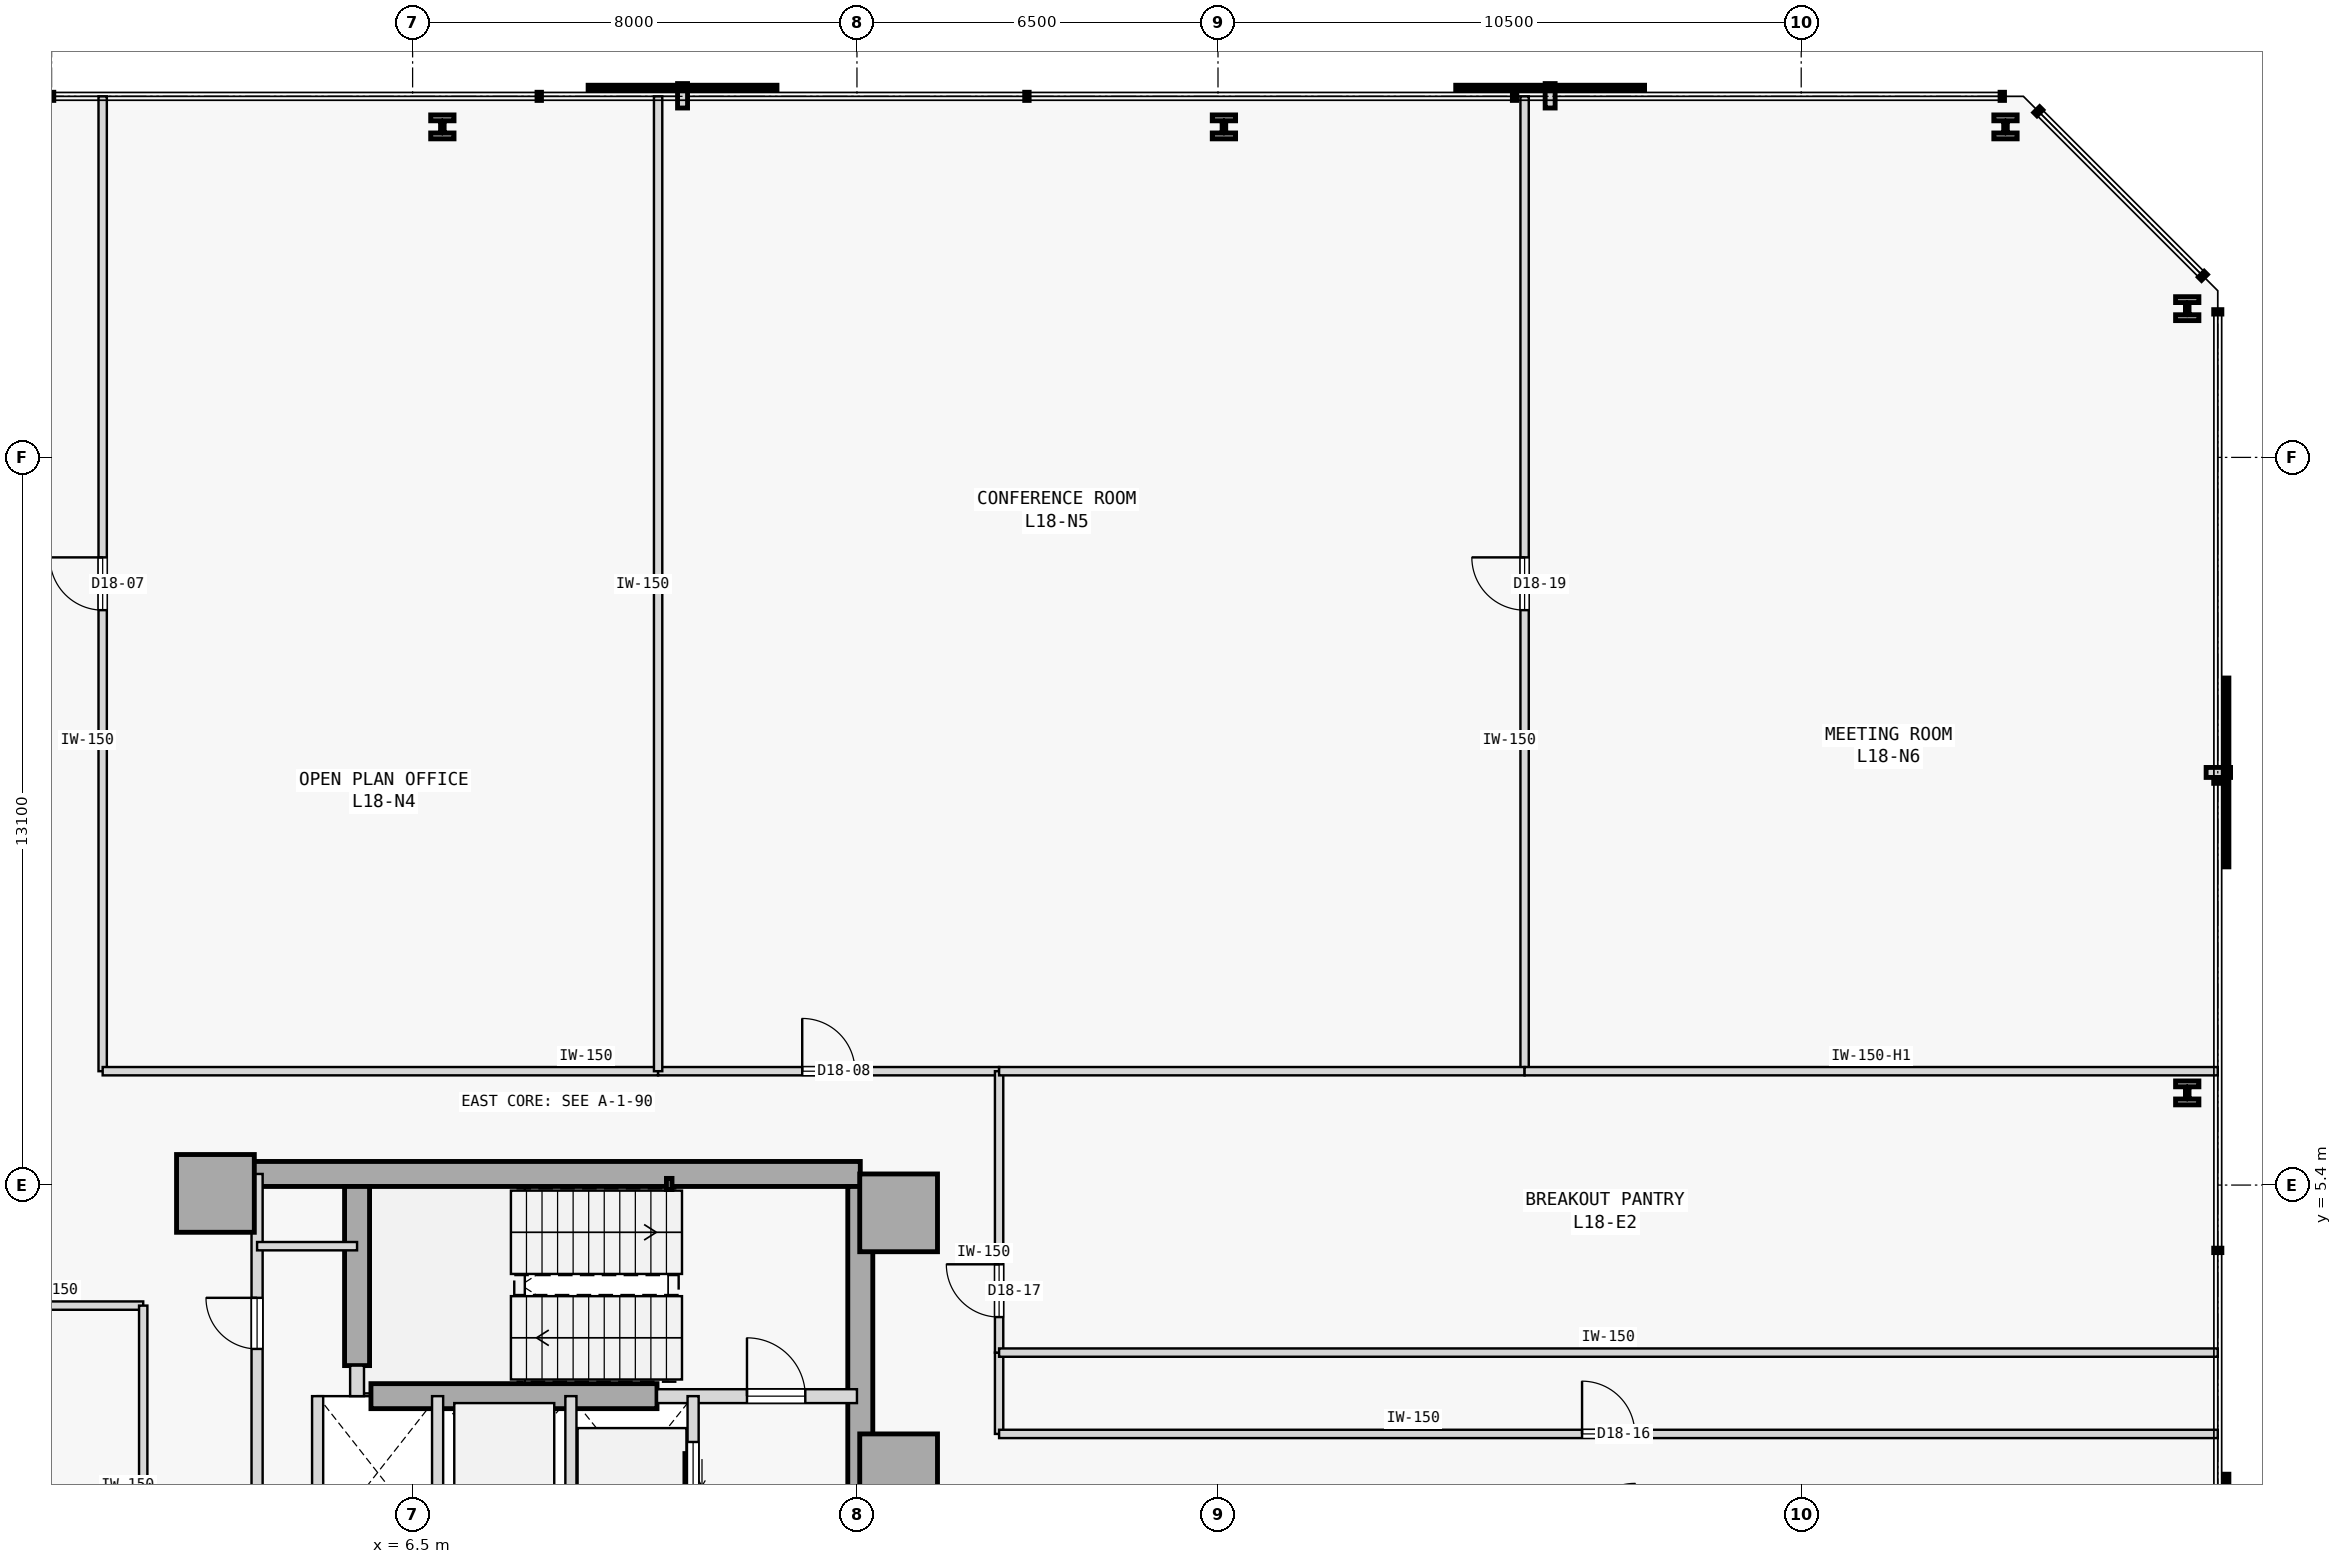
"""IFC4 building model, lengths in metres.
Left out: names, types, materials, properties, quantities, classifications, styles, units other than length and angle.
Written with IfcOpenShell. Run it as: python <this file> out.ifc"""

import sys

from ifc_helpers import new_model, si_unit, direction, frame, frame_2d, origin, origin_2d, place, context, subcontext, project, spatial, rectangle, hollow_rectangle, i_section, extrude, element, fill, save


model = new_model("IFC4")
c1 = context("Model", 3, precision=1e-05, world=origin(), true_north=direction((0.0, 1.0)))
c2 = subcontext(c1, "Body", "Model", "MODEL_VIEW")
j1 = project(units=[si_unit("LENGTHUNIT", "METRE"), si_unit("PLANEANGLEUNIT", "RADIAN")], contexts=[c1])
p1 = place(None, origin())
s1 = spatial("IfcSite", under=j1, at=p1, CompositionType="ELEMENT")
p2 = place(p1, origin())
s2 = spatial("IfcBuilding", under=s1, at=p2, CompositionType="ELEMENT")
p3 = place(p2, frame((0.0, 0.0, 75.0)))
s3 = spatial("IfcBuildingStorey", under=s2, at=p3, CompositionType="ELEMENT", Elevation=75.0)
for number, where, z_axis, x_axis in (
    (1, (15.25, 4.9, 0.0), (0.0, 0.0, 1.0), (1.0, 0.0, 0.0)),
    (2, (15.25, 0.22, 0.0), (0.0, 0.0, 1.0), (1.0, 0.0, 0.0)),
    (3, (2.95, 5.25, 0.0), (0.0, 0.0, 1.0), (1.0, 0.0, 0.0)),
):
    element("IfcColumn", number, at=place(p3, frame(where, z_axis=z_axis, x_axis=x_axis)), inside=s3, PredefinedType="COLUMN", context=c2, shape_type="SweptSolid", body=[
        extrude(rectangle(XDim=1.4, YDim=1.4, at=origin_2d()), origin(), (0.0, 0.0, 1.0), 3.8),
    ])
p4 = place(p3, frame((3.15, 5.6, 0.0), z_axis=(0.0, 0.0, 1.0), x_axis=(1.0, 0.0, 0.0)))
e4 = element("IfcWall", 4, at=p4, inside=s3, PredefinedType="SHEAR", context=c2, shape_type="SweptSolid", body=[
    extrude(rectangle(XDim=11.41, YDim=0.45, at=frame_2d((5.705, 0.0))), origin(), (0.0, 0.0, 1.0), 3.4),
])
p5 = place(p3, frame((14.56, -5.375, 0.0), z_axis=(0.0, 0.0, 1.0), x_axis=(0.0, 1.0, 0.0)))
e5 = element("IfcWall", 5, at=p5, inside=s3, PredefinedType="SHEAR", context=c2, shape_type="SweptSolid", body=[
    extrude(rectangle(XDim=10.75, YDim=0.45, at=frame_2d((5.375, 0.0))), origin(), (0.0, 0.0, 1.0), 3.4),
])
p6 = place(p3, frame((5.5, 2.15, 0.0), z_axis=(0.0, 0.0, 1.0), x_axis=(0.0, 1.0, 0.0)))
e6 = element("IfcWall", 6, at=p6, inside=s3, PredefinedType="SHEAR", context=c2, shape_type="SweptSolid", body=[
    extrude(rectangle(XDim=3.225, YDim=0.45, at=frame_2d((1.613, 0.0))), origin(), (0.0, 0.0, 1.0), 3.4),
])
p7 = place(p3, frame((5.75, 1.6, 0.0), z_axis=(0.0, 0.0, 1.0), x_axis=(1.0, 0.0, 0.0)))
e7 = element("IfcWall", 7, at=p7, inside=s3, PredefinedType="SHEAR", context=c2, shape_type="SweptSolid", body=[
    extrude(rectangle(XDim=5.15, YDim=0.45, at=frame_2d((2.575, 0.0))), origin(), (0.0, 0.0, 1.0), 3.4),
])
p8 = place(p3, frame((11.12, 5.42, 0.0), z_axis=(0.0, 0.0, 1.0), x_axis=(1.0, 0.0, 0.0)))
e8 = element("IfcColumn", 8, at=p8, inside=s3, PredefinedType="COLUMN", context=c2, shape_type="SweptSolid", body=[
    extrude(hollow_rectangle(XDim=0.1, YDim=0.2, WallThickness=0.008, at=origin_2d()), origin(), (0.0, 0.0, 1.0), 3.8),
])
for number, where, z_axis, x_axis in (
    (9, (38.45, 7.059, 0.0), (0.0, 0.0, 1.0), (1.0, 0.0, 0.0)),
    (10, (38.45, 21.178, 0.0), (0.0, 0.0, 1.0), (1.0, 0.0, 0.0)),
    (11, (35.178, 24.45, 0.0), (0.0, 0.0, 1.0), (1.0, 0.0, 0.0)),
    (12, (21.107, 24.45, 0.0), (0.0, 0.0, 1.0), (1.0, 0.0, 0.0)),
    (13, (7.036, 24.45, 0.0), (0.0, 0.0, 1.0), (1.0, 0.0, 0.0)),
):
    element("IfcColumn", number, at=place(p3, frame(where, z_axis=z_axis, x_axis=x_axis)), inside=s3, PredefinedType="COLUMN", context=c2, shape_type="SweptSolid", body=[
        extrude(i_section(OverallWidth=0.42, OverallDepth=0.431, WebThickness=0.065, FlangeThickness=0.106, FilletRadius=0.015, at=origin_2d()), origin(), (0.0, 0.0, 1.0), 3.8),
    ])
p9 = place(p3, frame((10.9, 1.6, 0.0), z_axis=(0.0, 0.0, 1.0), x_axis=(1.0, 0.0, 0.0)))
e14 = element("IfcWall", 14, at=p9, inside=s3, PredefinedType="STANDARD", context=c2, shape_type="SweptSolid", body=[
    extrude(rectangle(XDim=3.6, YDim=0.25, at=frame_2d((1.8, 0.0))), origin(), (0.0, 0.0, 1.0), 3.4),
])
p10 = place(p9, frame((1.62, 0.0, 0.0)))
e15 = element("IfcOpeningElement", 15, at=p10, cuts=e14, PredefinedType="OPENING", context=c2, shape_type="SweptSolid", body=[
    extrude(rectangle(XDim=1.05, YDim=2.15, at=frame_2d((0.525, 1.075))), frame((0.0, 0.135, 0.0), z_axis=(0.0, -1.0, 0.0), x_axis=(1.0, 0.0, 0.0)), (0.0, 0.0, 1.0), 0.27),
])
p11 = place(p3, frame((5.5, 1.6, 0.0), z_axis=(0.0, 0.0, 1.0), x_axis=(0.0, 1.0, 0.0)))
e16 = element("IfcWall", 16, at=p11, inside=s3, PredefinedType="STANDARD", context=c2, shape_type="SweptSolid", body=[
    extrude(rectangle(XDim=0.55, YDim=0.25, at=frame_2d((0.275, 0.0))), origin(), (0.0, 0.0, 1.0), 3.4),
])
p12 = place(p3, frame((3.7, -1.15, 0.0), z_axis=(0.0, 0.0, 1.0), x_axis=(0.0, 1.0, 0.0)))
e17 = element("IfcWall", 17, at=p12, inside=s3, PredefinedType="STANDARD", context=c2, shape_type="SweptSolid", body=[
    extrude(rectangle(XDim=6.75, YDim=0.2, at=frame_2d((3.375, 0.0))), origin(), (0.0, 0.0, 1.0), 3.4),
])
p13 = place(p12, frame((3.6, 0.0, 0.0)))
e18 = element("IfcOpeningElement", 18, at=p13, cuts=e17, PredefinedType="OPENING", context=c2, shape_type="SweptSolid", body=[
    extrude(rectangle(XDim=0.92, YDim=2.15, at=frame_2d((0.46, 1.075))), frame((0.0, 0.11, 0.0), z_axis=(0.0, -1.0, 0.0), x_axis=(1.0, 0.0, 0.0)), (0.0, 0.0, 1.0), 0.22),
])
p14 = place(p3, frame((11.55, -1.15, 0.0), z_axis=(0.0, 0.0, 1.0), x_axis=(0.0, 1.0, 0.0)))
e19 = element("IfcWall", 19, at=p14, inside=s3, PredefinedType="STANDARD", context=c2, shape_type="SweptSolid", body=[
    extrude(rectangle(XDim=2.75, YDim=0.2, at=frame_2d((1.375, 0.0))), origin(), (0.0, 0.0, 1.0), 3.4),
])
p15 = place(p14, frame((0.825, 0.0, 0.0)))
e20 = element("IfcOpeningElement", 20, at=p15, cuts=e19, PredefinedType="OPENING", context=c2, shape_type="SweptSolid", body=[
    extrude(rectangle(XDim=1.1, YDim=2.15, at=frame_2d((0.55, 1.075))), frame((0.0, 0.11, 0.0), z_axis=(0.0, -1.0, 0.0), x_axis=(1.0, 0.0, 0.0)), (0.0, 0.0, 1.0), 0.22),
])
for number, where, z_axis, x_axis in (
    (21, (9.35, -1.15, 0.0), (0.0, 0.0, 1.0), (0.0, 1.0, 0.0)),
    (22, (6.95, -1.15, 0.0), (0.0, 0.0, 1.0), (0.0, 1.0, 0.0)),
    (23, (4.79, -1.15, 0.0), (0.0, 0.0, 1.0), (0.0, 1.0, 0.0)),
):
    element("IfcWall", number, at=place(p3, frame(where, z_axis=z_axis, x_axis=x_axis)), inside=s3, PredefinedType="STANDARD", context=c2, shape_type="SweptSolid", body=[
        extrude(rectangle(XDim=2.75, YDim=0.2, at=frame_2d((1.375, 0.0))), origin(), (0.0, 0.0, 1.0), 3.4),
    ])
p16 = place(p3, frame((3.7, 4.3, 0.0), z_axis=(0.0, 0.0, 1.0), x_axis=(1.0, 0.0, 0.0)))
e24 = element("IfcWall", 24, at=p16, inside=s3, PredefinedType="PARTITIONING", context=c2, shape_type="SweptSolid", body=[
    extrude(rectangle(XDim=1.8, YDim=0.15, at=frame_2d((0.9, 0.0))), origin(), (0.0, 0.0, 1.0), 3.4),
])
p17 = place(p3, frame((-1.65, 3.23, 0.0), z_axis=(0.0, 0.0, 1.0), x_axis=(1.0, 0.0, 0.0)))
e25 = element("IfcWall", 25, at=p17, inside=s3, PredefinedType="PARTITIONING", context=c2, shape_type="SweptSolid", body=[
    extrude(rectangle(XDim=3.3, YDim=0.15, at=frame_2d((1.65, 0.0))), origin(), (0.0, 0.0, 1.0), 3.4),
])
p18 = place(p3, frame((1.65, -3.23, 0.0), z_axis=(0.0, 0.0, 1.0), x_axis=(0.0, 1.0, 0.0)))
e26 = element("IfcWall", 26, at=p18, inside=s3, PredefinedType="PARTITIONING", context=c2, shape_type="SweptSolid", body=[
    extrude(rectangle(XDim=6.46, YDim=0.15, at=frame_2d((3.23, 0.0))), origin(), (0.0, 0.0, 1.0), 3.4),
])
p19 = place(p3, frame((0.92, 7.45, 0.0), z_axis=(0.0, 0.0, 1.0), x_axis=(0.0, 1.0, 0.0)))
e27 = element("IfcWall", 27, at=p19, inside=s3, PredefinedType="PARTITIONING", context=c2, shape_type="SweptSolid", body=[
    extrude(rectangle(XDim=17.55, YDim=0.15, at=frame_2d((8.775, 0.0))), origin(), (0.0, 0.0, 1.0), 3.4),
])
p20 = place(p19, frame((8.3, 0.0, 0.0)))
e28 = element("IfcOpeningElement", 28, at=p20, cuts=e27, PredefinedType="OPENING", context=c2, shape_type="SweptSolid", body=[
    extrude(rectangle(XDim=0.95, YDim=2.15, at=frame_2d((0.475, 1.075))), frame((0.0, 0.085, 0.0), z_axis=(0.0, -1.0, 0.0), x_axis=(1.0, 0.0, 0.0)), (0.0, 0.0, 1.0), 0.17),
])
p21 = place(p3, frame((0.92, 7.45, 0.0), z_axis=(0.0, 0.0, 1.0), x_axis=(1.0, 0.0, 0.0)))
e29 = element("IfcWall", 29, at=p21, inside=s3, PredefinedType="PARTITIONING", context=c2, shape_type="SweptSolid", body=[
    extrude(rectangle(XDim=10.0, YDim=0.15, at=frame_2d((5.0, 0.0))), origin(), (0.0, 0.0, 1.0), 3.4),
])
p22 = place(p3, frame((10.92, 7.45, 0.0), z_axis=(0.0, 0.0, 1.0), x_axis=(1.0, 0.0, 0.0)))
e30 = element("IfcWall", 30, at=p22, inside=s3, PredefinedType="PARTITIONING", context=c2, shape_type="SweptSolid", body=[
    extrude(rectangle(XDim=6.139, YDim=0.15, at=frame_2d((3.07, 0.0))), origin(), (0.0, 0.0, 1.0), 3.4),
])
p23 = place(p22, frame((2.594, 0.0, 0.0)))
e31 = element("IfcOpeningElement", 31, at=p23, cuts=e30, PredefinedType="OPENING", context=c2, shape_type="SweptSolid", body=[
    extrude(rectangle(XDim=0.95, YDim=2.15, at=frame_2d((0.475, 1.075))), frame((0.0, 0.085, 0.0), z_axis=(0.0, -1.0, 0.0), x_axis=(1.0, 0.0, 0.0)), (0.0, 0.0, 1.0), 0.17),
])
p24 = place(p3, frame((17.059, 0.92, 0.0), z_axis=(0.0, 0.0, 1.0), x_axis=(0.0, 1.0, 0.0)))
e32 = element("IfcWall", 32, at=p24, inside=s3, PredefinedType="PARTITIONING", context=c2, shape_type="SweptSolid", body=[
    extrude(rectangle(XDim=1.464, YDim=0.15, at=frame_2d((0.732, 0.0))), origin(), (0.0, 0.0, 1.0), 3.4),
])
p25 = place(p3, frame((17.059, 0.92, 0.0), z_axis=(0.0, 0.0, 1.0), x_axis=(1.0, 0.0, 0.0)))
e33 = element("IfcWall", 33, at=p25, inside=s3, PredefinedType="PARTITIONING", context=c2, shape_type="SweptSolid", body=[
    extrude(rectangle(XDim=21.941, YDim=0.15, at=frame_2d((10.97, 0.0))), origin(), (0.0, 0.0, 1.0), 3.4),
])
p26 = place(p25, frame((10.496, 0.0, 0.0)))
e34 = element("IfcOpeningElement", 34, at=p26, cuts=e33, PredefinedType="OPENING", context=c2, shape_type="SweptSolid", body=[
    extrude(rectangle(XDim=0.95, YDim=2.15, at=frame_2d((0.475, 1.075))), frame((0.0, 0.085, 0.0), z_axis=(0.0, -1.0, 0.0), x_axis=(1.0, 0.0, 0.0)), (0.0, 0.0, 1.0), 0.17),
])
p27 = place(p3, frame((17.059, 2.384, 0.0), z_axis=(0.0, 0.0, 1.0), x_axis=(0.0, 1.0, 0.0)))
e35 = element("IfcWall", 35, at=p27, inside=s3, PredefinedType="PARTITIONING", context=c2, shape_type="SweptSolid", body=[
    extrude(rectangle(XDim=5.066, YDim=0.15, at=frame_2d((2.533, 0.0))), origin(), (0.0, 0.0, 1.0), 3.4),
])
p28 = place(p27, frame((0.639, 0.0, 0.0)))
e36 = element("IfcOpeningElement", 36, at=p28, cuts=e35, PredefinedType="OPENING", context=c2, shape_type="SweptSolid", body=[
    extrude(rectangle(XDim=0.95, YDim=2.15, at=frame_2d((0.475, 1.075))), frame((0.0, 0.085, 0.0), z_axis=(0.0, -1.0, 0.0), x_axis=(1.0, 0.0, 0.0)), (0.0, 0.0, 1.0), 0.17),
])
p29 = place(p3, frame((10.92, 7.45, 0.0), z_axis=(0.0, 0.0, 1.0), x_axis=(0.0, 1.0, 0.0)))
e37 = element("IfcWall", 37, at=p29, inside=s3, PredefinedType="PARTITIONING", context=c2, shape_type="SweptSolid", body=[
    extrude(rectangle(XDim=17.55, YDim=0.15, at=frame_2d((8.775, 0.0))), origin(), (0.0, 0.0, 1.0), 3.4),
])
p30 = place(p3, frame((26.52, 7.45, 0.0), z_axis=(0.0, 0.0, 1.0), x_axis=(0.0, 1.0, 0.0)))
e38 = element("IfcWall", 38, at=p30, inside=s3, PredefinedType="PARTITIONING", context=c2, shape_type="SweptSolid", body=[
    extrude(rectangle(XDim=17.55, YDim=0.15, at=frame_2d((8.775, 0.0))), origin(), (0.0, 0.0, 1.0), 3.4),
])
p31 = place(p30, frame((8.3, 0.0, 0.0)))
e39 = element("IfcOpeningElement", 39, at=p31, cuts=e38, PredefinedType="OPENING", context=c2, shape_type="SweptSolid", body=[
    extrude(rectangle(XDim=0.95, YDim=2.15, at=frame_2d((0.475, 1.075))), frame((0.0, 0.085, 0.0), z_axis=(0.0, -1.0, 0.0), x_axis=(1.0, 0.0, 0.0)), (0.0, 0.0, 1.0), 0.17),
])
p32 = place(p3, frame((17.059, 7.45, 0.0), z_axis=(0.0, 0.0, 1.0), x_axis=(1.0, 0.0, 0.0)))
e40 = element("IfcWall", 40, at=p32, inside=s3, PredefinedType="PARTITIONING", context=c2, shape_type="SweptSolid", body=[
    extrude(rectangle(XDim=9.461, YDim=0.15, at=frame_2d((4.73, 0.0))), origin(), (0.0, 0.0, 1.0), 3.4),
])
p33 = place(p3, frame((26.52, 7.45, 0.0), z_axis=(0.0, 0.0, 1.0), x_axis=(1.0, 0.0, 0.0)))
e41 = element("IfcWall", 41, at=p33, inside=s3, PredefinedType="PARTITIONING", context=c2, shape_type="SweptSolid", body=[
    extrude(rectangle(XDim=12.48, YDim=0.15, at=frame_2d((6.24, 0.0))), origin(), (0.0, 0.0, 1.0), 2.95),
])
p34 = place(p3, frame((17.059, 2.384, 0.0), z_axis=(0.0, 0.0, 1.0), x_axis=(1.0, 0.0, 0.0)))
e42 = element("IfcWall", 42, at=p34, inside=s3, PredefinedType="PARTITIONING", context=c2, shape_type="SweptSolid", body=[
    extrude(rectangle(XDim=21.941, YDim=0.15, at=frame_2d((10.97, 0.0))), origin(), (0.0, 0.0, 1.0), 3.4),
])
p35 = place(p10, origin())
e43 = element("IfcDoor", 43, at=p35, inside=s3, OperationType="SINGLE_SWING_LEFT", PredefinedType="DOOR", context=c2, shape_type="SweptSolid", body=[
    extrude(rectangle(XDim=1.05, YDim=2.15, at=frame_2d((0.525, 1.075))), frame((0.0, 0.025, 0.0), z_axis=(0.0, -1.0, 0.0), x_axis=(1.0, 0.0, 0.0)), (0.0, 0.0, 1.0), 0.05),
])
fill(e15, e43)
p36 = place(p15, origin())
e44 = element("IfcDoor", 44, at=p36, inside=s3, OperationType="SLIDING_TO_RIGHT", PredefinedType="DOOR", context=c2, shape_type="SweptSolid", body=[
    extrude(rectangle(XDim=1.1, YDim=2.15, at=frame_2d((0.55, 1.075))), frame((0.0, 0.025, 0.0), z_axis=(0.0, -1.0, 0.0), x_axis=(1.0, 0.0, 0.0)), (0.0, 0.0, 1.0), 0.05),
])
fill(e20, e44)
p37 = place(p13, origin())
e45 = element("IfcDoor", 45, at=p37, inside=s3, OperationType="SINGLE_SWING_RIGHT", PredefinedType="DOOR", context=c2, shape_type="SweptSolid", body=[
    extrude(rectangle(XDim=0.92, YDim=2.15, at=frame_2d((0.46, 1.075))), frame((0.0, 0.025, 0.0), z_axis=(0.0, -1.0, 0.0), x_axis=(1.0, 0.0, 0.0)), (0.0, 0.0, 1.0), 0.05),
])
fill(e18, e45)
p38 = place(p20, origin())
e46 = element("IfcDoor", 46, at=p38, inside=s3, OperationType="SINGLE_SWING_RIGHT", PredefinedType="DOOR", context=c2, shape_type="SweptSolid", body=[
    extrude(rectangle(XDim=0.95, YDim=2.15, at=frame_2d((0.475, 1.075))), frame((0.0, 0.025, 0.0), z_axis=(0.0, -1.0, 0.0), x_axis=(1.0, 0.0, 0.0)), (0.0, 0.0, 1.0), 0.05),
])
fill(e28, e46)
p39 = place(p23, origin())
e47 = element("IfcDoor", 47, at=p39, inside=s3, OperationType="SINGLE_SWING_LEFT", PredefinedType="DOOR", context=c2, shape_type="SweptSolid", body=[
    extrude(rectangle(XDim=0.95, YDim=2.15, at=frame_2d((0.475, 1.075))), frame((0.0, 0.025, 0.0), z_axis=(0.0, -1.0, 0.0), x_axis=(1.0, 0.0, 0.0)), (0.0, 0.0, 1.0), 0.05),
])
fill(e31, e47)
p40 = place(p26, origin())
e48 = element("IfcDoor", 48, at=p40, inside=s3, OperationType="SINGLE_SWING_LEFT", PredefinedType="DOOR", context=c2, shape_type="SweptSolid", body=[
    extrude(rectangle(XDim=0.95, YDim=2.15, at=frame_2d((0.475, 1.075))), frame((0.0, 0.025, 0.0), z_axis=(0.0, -1.0, 0.0), x_axis=(1.0, 0.0, 0.0)), (0.0, 0.0, 1.0), 0.05),
])
fill(e34, e48)
p41 = place(p28, origin())
e49 = element("IfcDoor", 49, at=p41, inside=s3, OperationType="SINGLE_SWING_RIGHT", PredefinedType="DOOR", context=c2, shape_type="SweptSolid", body=[
    extrude(rectangle(XDim=0.95, YDim=2.15, at=frame_2d((0.475, 1.075))), frame((0.0, 0.025, 0.0), z_axis=(0.0, -1.0, 0.0), x_axis=(1.0, 0.0, 0.0)), (0.0, 0.0, 1.0), 0.05),
])
fill(e36, e49)
p42 = place(p31, origin())
e50 = element("IfcDoor", 50, at=p42, inside=s3, OperationType="SINGLE_SWING_RIGHT", PredefinedType="DOOR", context=c2, shape_type="SweptSolid", body=[
    extrude(rectangle(XDim=0.95, YDim=2.15, at=frame_2d((0.475, 1.075))), frame((0.0, 0.025, 0.0), z_axis=(0.0, -1.0, 0.0), x_axis=(1.0, 0.0, 0.0)), (0.0, 0.0, 1.0), 0.05),
])
fill(e39, e50)
save(model, sys.argv[1])
